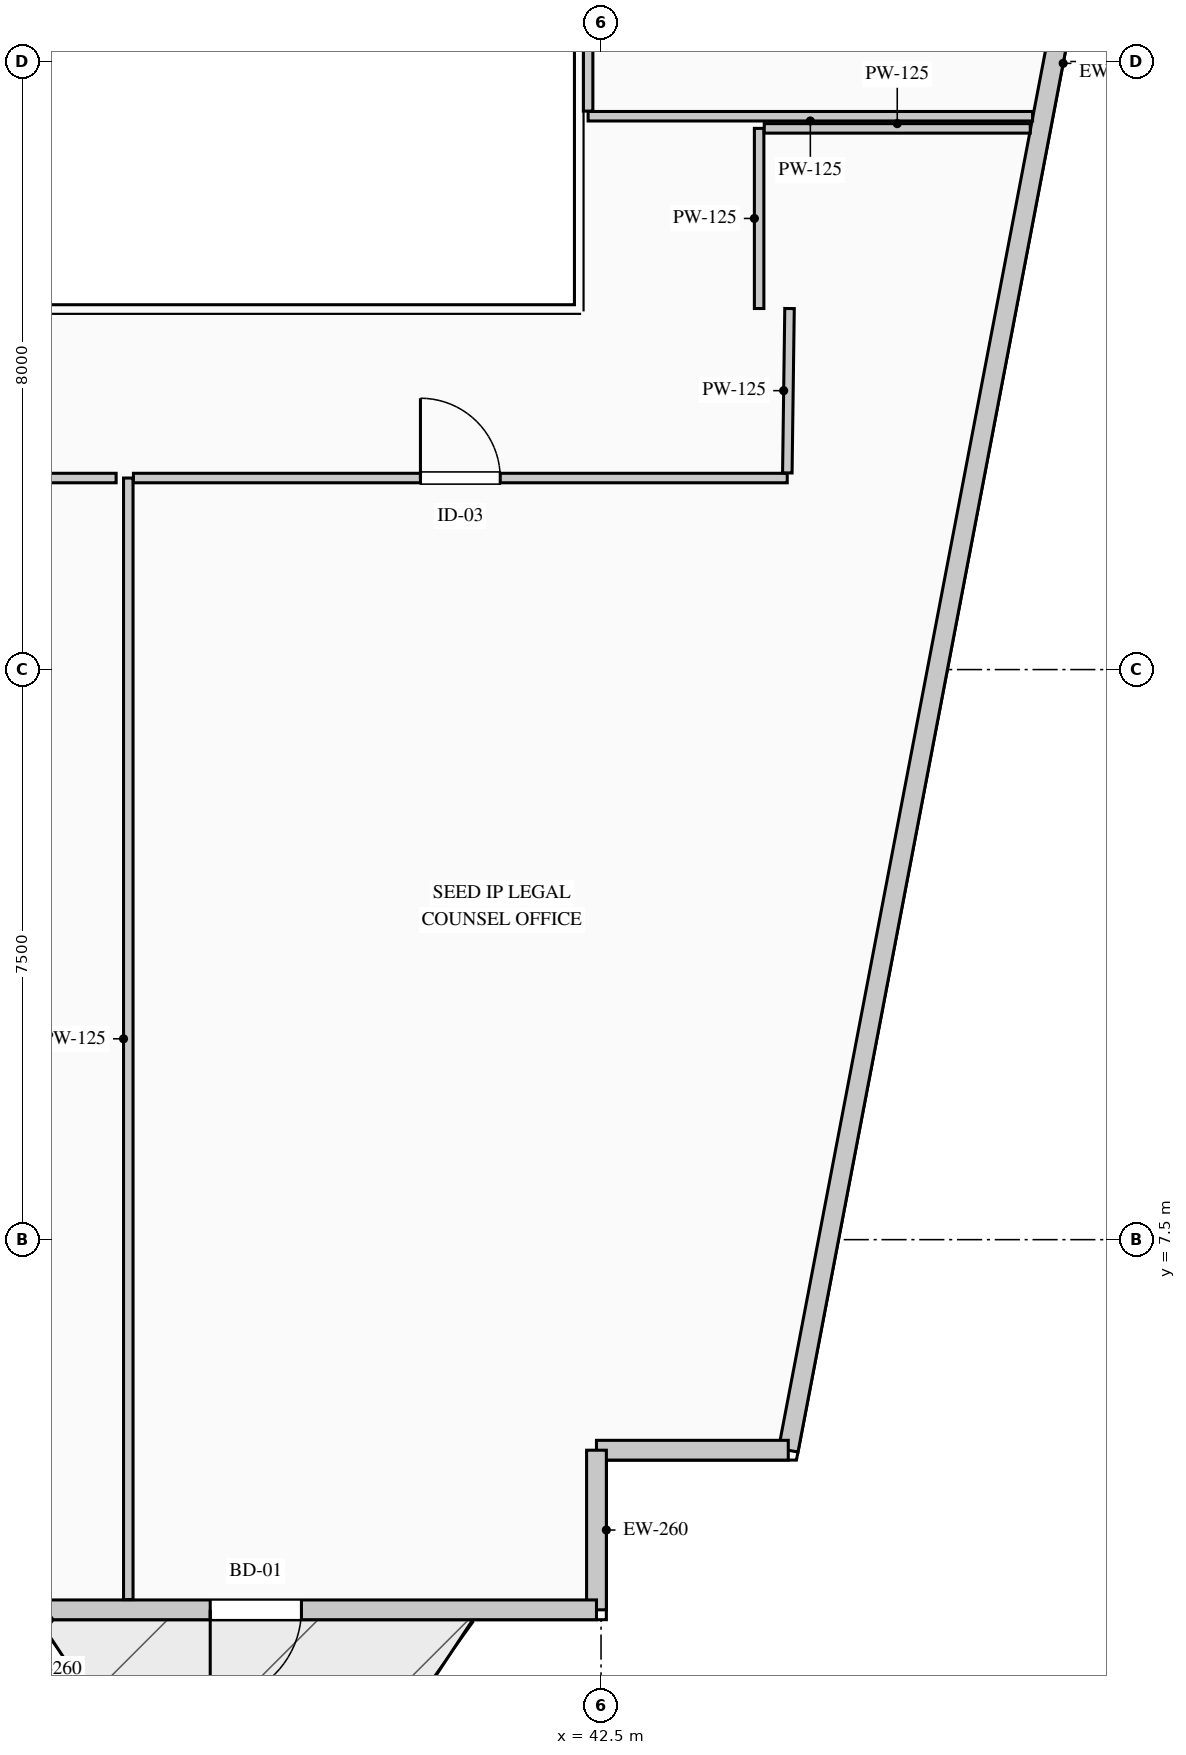
"""IFC4 building model, lengths in metres.
Left out: names, types, materials, properties, quantities, classifications, styles, units other than length and angle.
Written with IfcOpenShell. Run it as: python <this file> out.ifc"""

import sys

from ifc_helpers import new_model, si_unit, direction, frame, frame_2d, origin, place, context, subcontext, project, spatial, rectangle, extrude, element, fill, save


model = new_model("IFC4")
c1 = context("Model", 3, precision=1e-05, world=origin(), true_north=direction((0.0, 1.0)))
c2 = subcontext(c1, "Body", "Model", "MODEL_VIEW")
j1 = project(units=[si_unit("LENGTHUNIT", "METRE"), si_unit("PLANEANGLEUNIT", "RADIAN")], contexts=[c1])
p1 = place(None, origin())
s1 = spatial("IfcSite", under=j1, at=p1, CompositionType="ELEMENT")
p2 = place(p1, origin())
s2 = spatial("IfcBuilding", under=s1, at=p2, CompositionType="ELEMENT")
p3 = place(p2, frame((0.0, 0.0, 150.9)))
s3 = spatial("IfcBuildingStorey", under=s2, at=p3, CompositionType="ELEMENT", Elevation=150.9)
p4 = place(p3, frame((51.942, 41.27, 0.0), z_axis=(0.0, 0.0, 1.0), x_axis=(-0.187592192405, -0.982247000173, 0.0)))
e1 = element("IfcWall", 1, at=p4, inside=s3, PredefinedType="STANDARD", context=c2, shape_type="SweptSolid", body=[
    extrude(rectangle(XDim=37.2, YDim=0.26, at=frame_2d((18.6, 0.0))), origin(), (0.0, 0.0, 1.0), 3.69),
])
p5 = place(p4, frame((12.342, 0.0, 0.9)))
e2 = element("IfcOpeningElement", 2, at=p5, cuts=e1, PredefinedType="OPENING", context=c2, shape_type="SweptSolid", body=[
    extrude(rectangle(XDim=2.1, YDim=2.0, at=frame_2d((1.05, 1.0))), frame((0.0, 0.14, 0.0), z_axis=(0.0, -1.0, 0.0), x_axis=(1.0, 0.0, 0.0)), (0.0, 0.0, 1.0), 0.28),
])
p6 = place(p3, frame((44.963, 4.73, 0.0), z_axis=(0.0, 0.0, 1.0), x_axis=(-1.0, 0.0, 0.0)))
e3 = element("IfcWall", 3, at=p6, inside=s3, PredefinedType="STANDARD", context=c2, shape_type="SweptSolid", body=[
    extrude(rectangle(XDim=2.523, YDim=0.26, at=frame_2d((1.262, 0.0))), origin(), (0.0, 0.0, 1.0), 3.69),
])
p7 = place(p3, frame((42.44, 4.73, 0.0), z_axis=(0.0, 0.0, 1.0), x_axis=(0.0, -1.0, 0.0)))
e4 = element("IfcWall", 4, at=p7, inside=s3, PredefinedType="STANDARD", context=c2, shape_type="SweptSolid", body=[
    extrude(rectangle(XDim=2.1, YDim=0.26, at=frame_2d((1.05, 0.0))), origin(), (0.0, 0.0, 1.0), 3.69),
])
p8 = place(p3, frame((42.44, 2.63, 0.0), z_axis=(0.0, 0.0, 1.0), x_axis=(-1.0, 0.0, 0.0)))
e5 = element("IfcWall", 5, at=p8, inside=s3, PredefinedType="STANDARD", context=c2, shape_type="SweptSolid", body=[
    extrude(rectangle(XDim=8.965, YDim=0.26, at=frame_2d((4.482, 0.0))), origin(), (0.0, 0.0, 1.0), 3.69),
])
p9 = place(p8, frame((3.882, 0.0, 0.0)))
e6 = element("IfcOpeningElement", 6, at=p9, cuts=e5, PredefinedType="OPENING", context=c2, shape_type="SweptSolid", body=[
    extrude(rectangle(XDim=1.2, YDim=2.2, at=frame_2d((0.6, 1.1))), frame((0.0, 0.14, 0.0), z_axis=(0.0, -1.0, 0.0), x_axis=(1.0, 0.0, 0.0)), (0.0, 0.0, 1.0), 0.28),
])
p10 = place(p3, frame((44.58, 19.75, 0.0), z_axis=(0.0, 0.0, 1.0), x_axis=(0.0, 1.0, 0.0)))
e7 = element("IfcWall", 7, at=p10, inside=s3, PredefinedType="PARTITIONING", context=c2, shape_type="SweptSolid", body=[
    extrude(rectangle(XDim=2.37, YDim=0.125, at=frame_2d((1.185, 0.0))), origin(), (0.0, 0.0, 1.0), 3.69),
])
p11 = place(p3, frame((44.647, 22.12, 0.0), z_axis=(0.0, 0.0, 1.0), x_axis=(1.0, 0.0, 0.0)))
e8 = element("IfcWall", 8, at=p11, inside=s3, PredefinedType="PARTITIONING", context=c2, shape_type="SweptSolid", body=[
    extrude(rectangle(XDim=3.5, YDim=0.125, at=frame_2d((1.75, 0.0))), origin(), (0.0, 0.0, 1.0), 3.69),
])
p12 = place(p3, frame((36.28, 2.765, 0.0), z_axis=(0.0, 0.0, 1.0), x_axis=(0.0, 1.0, 0.0)))
e9 = element("IfcWall", 9, at=p12, inside=s3, PredefinedType="PARTITIONING", context=c2, shape_type="SweptSolid", body=[
    extrude(rectangle(XDim=14.755, YDim=0.125, at=frame_2d((7.377, 0.0))), origin(), (0.0, 0.0, 1.0), 3.69),
])
p13 = place(p3, frame((36.347, 17.52, 0.0), z_axis=(0.0, 0.0, 1.0), x_axis=(1.0, 0.0, 0.0)))
e10 = element("IfcWall", 10, at=p13, inside=s3, PredefinedType="PARTITIONING", context=c2, shape_type="SweptSolid", body=[
    extrude(rectangle(XDim=8.603, YDim=0.125, at=frame_2d((4.301, 0.0))), origin(), (0.0, 0.0, 1.0), 3.69),
])
p14 = place(p13, frame((3.776, 0.0, 0.0)))
e11 = element("IfcOpeningElement", 11, at=p14, cuts=e10, PredefinedType="OPENING", context=c2, shape_type="SweptSolid", body=[
    extrude(rectangle(XDim=1.05, YDim=2.15, at=frame_2d((0.525, 1.075))), frame((0.0, 0.073, 0.0), z_axis=(0.0, -1.0, 0.0), x_axis=(1.0, 0.0, 0.0)), (0.0, 0.0, 1.0), 0.145),
])
p15 = place(p3, frame((44.951, 17.587, 0.0), z_axis=(0.0, 0.0, 1.0), x_axis=(0.01343297167, 0.999909773566, 0.0)))
e12 = element("IfcWall", 12, at=p15, inside=s3, PredefinedType="PARTITIONING", context=c2, shape_type="SweptSolid", body=[
    extrude(rectangle(XDim=2.163, YDim=0.125, at=frame_2d((1.082, 0.0))), origin(), (0.0, 0.0, 1.0), 3.69),
])
p16 = place(p3, frame((28.08, 17.52, 0.0), z_axis=(0.0, 0.0, 1.0), x_axis=(1.0, 0.0, 0.0)))
e13 = element("IfcWall", 13, at=p16, inside=s3, PredefinedType="PARTITIONING", context=c2, shape_type="SweptSolid", body=[
    extrude(rectangle(XDim=8.04, YDim=0.125, at=frame_2d((4.02, 0.0))), origin(), (0.0, 0.0, 1.0), 3.475),
])
p17 = place(p16, frame((3.495, 0.0, 0.0)))
e14 = element("IfcOpeningElement", 14, at=p17, cuts=e13, PredefinedType="OPENING", context=c2, shape_type="SweptSolid", body=[
    extrude(rectangle(XDim=1.05, YDim=2.15, at=frame_2d((0.525, 1.075))), frame((0.0, 0.073, 0.0), z_axis=(0.0, -1.0, 0.0), x_axis=(1.0, 0.0, 0.0)), (0.0, 0.0, 1.0), 0.145),
])
p18 = place(p3, frame((48.178, 22.28, 0.0), z_axis=(0.0, 0.0, 1.0), x_axis=(-1.0, 0.0, 0.0)))
e15 = element("IfcWall", 15, at=p18, inside=s3, PredefinedType="PARTITIONING", context=c2, shape_type="SweptSolid", body=[
    extrude(rectangle(XDim=5.848, YDim=0.125, at=frame_2d((2.924, 0.0))), origin(), (0.0, 0.0, 1.0), 3.69),
])
p19 = place(p3, frame((42.33, 22.347, 0.0), z_axis=(0.0, 0.0, 1.0), x_axis=(0.0, 1.0, 0.0)))
e16 = element("IfcWall", 16, at=p19, inside=s3, PredefinedType="PARTITIONING", context=c2, shape_type="SweptSolid", body=[
    extrude(rectangle(XDim=6.282, YDim=0.125, at=frame_2d((3.141, 0.0))), origin(), (0.0, 0.0, 1.0), 3.69),
])
p20 = place(p9, origin())
e17 = element("IfcDoor", 17, at=p20, inside=s3, OperationType="SINGLE_SWING_RIGHT", PredefinedType="DOOR", context=c2, shape_type="SweptSolid", body=[
    extrude(rectangle(XDim=1.2, YDim=2.2, at=frame_2d((0.6, 1.1))), frame((0.0, 0.025, 0.0), z_axis=(0.0, -1.0, 0.0), x_axis=(1.0, 0.0, 0.0)), (0.0, 0.0, 1.0), 0.05),
])
fill(e6, e17)
p21 = place(p14, origin())
e18 = element("IfcDoor", 18, at=p21, inside=s3, OperationType="SINGLE_SWING_LEFT", PredefinedType="DOOR", context=c2, shape_type="SweptSolid", body=[
    extrude(rectangle(XDim=1.05, YDim=2.15, at=frame_2d((0.525, 1.075))), frame((0.0, 0.025, 0.0), z_axis=(0.0, -1.0, 0.0), x_axis=(1.0, 0.0, 0.0)), (0.0, 0.0, 1.0), 0.05),
])
fill(e11, e18)
save(model, sys.argv[1])
